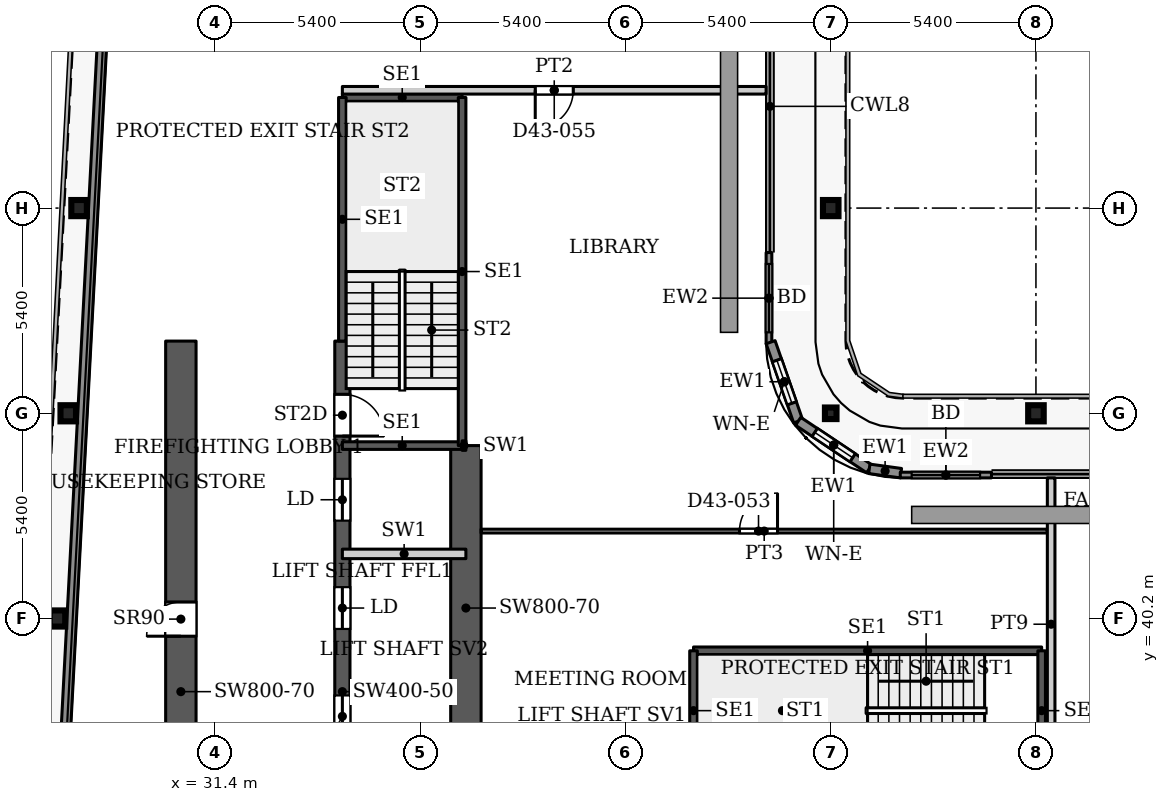
"""IFC4 building model, lengths in metres.
Left out: names, types, materials, properties, quantities, classifications, styles, units other than length and angle.
Written with IfcOpenShell. Run it as: python <this file> out.ifc"""

import sys

from ifc_helpers import new_model, si_unit, direction, frame, frame_2d, origin, origin_2d, place, context, subcontext, project, spatial, rectangle, hollow_rectangle, i_section, extrude, source, transform, mapped, element, fill, save


model = new_model("IFC4")
c1 = context("Model", 3, precision=1e-05, world=origin(), true_north=direction((0.0, 1.0)))
c2 = subcontext(c1, "Body", "Model", "MODEL_VIEW")
j1 = project(units=[si_unit("LENGTHUNIT", "METRE"), si_unit("PLANEANGLEUNIT", "RADIAN")], contexts=[c1])
p1 = place(None, origin())
s1 = spatial("IfcSite", under=j1, at=p1, CompositionType="ELEMENT")
p2 = place(p1, origin())
s2 = spatial("IfcBuilding", under=s1, at=p2, CompositionType="ELEMENT")
p3 = place(p2, frame((0.0, 0.0, 183.8)))
s3 = spatial("IfcBuildingStorey", under=s2, at=p3, CompositionType="ELEMENT", Elevation=183.8)
for number, where, z_axis, x_axis in (
    (1, (27.253, 40.2, 0.0), (0.0, 0.0, 1.0), (1.0, 0.0, 0.0)),
    (2, (27.537, 45.6, 0.0), (0.0, 0.0, 1.0), (1.0, 0.0, 0.0)),
    (3, (53.0, 45.6, 0.0), (0.0, 0.0, 1.0), (1.0, 0.0, 0.0)),
    (4, (27.822, 51.0, 0.0), (0.0, 0.0, 1.0), (1.0, 0.0, 0.0)),
    (5, (47.6, 51.0, 0.0), (0.0, 0.0, 1.0), (1.0, 0.0, 0.0)),
):
    element("IfcColumn", number, at=place(p3, frame(where, z_axis=z_axis, x_axis=x_axis)), inside=s3, PredefinedType="COLUMN", context=c2, shape_type="SweptSolid", body=[
        extrude(i_section(OverallWidth=0.409, OverallDepth=0.425, WebThickness=0.033, FlangeThickness=0.052, FilletRadius=0.013, at=origin_2d()), origin(), (0.0, 0.0, 1.0), 3.9),
    ])
p4 = place(p3, frame((47.6, 45.6, 0.0), z_axis=(0.0, 0.0, 1.0), x_axis=(1.0, 0.0, 0.0)))
e6 = element("IfcColumn", 6, at=p4, inside=s3, PredefinedType="COLUMN", context=c2, shape_type="SweptSolid", body=[
    extrude(hollow_rectangle(XDim=0.305, YDim=0.305, WallThickness=0.016, InnerFilletRadius=0.016, OuterFilletRadius=0.032, at=origin_2d()), origin(), (0.0, 0.0, 1.0), 3.9),
])
p5 = place(p3, frame((34.75, 29.05, 0.0), z_axis=(0.0, 0.0, 1.0), x_axis=(0.0, 1.0, 0.0)))
e7 = element("IfcWall", 7, at=p5, inside=s3, PredefinedType="SHEAR", context=c2, shape_type="SweptSolid", body=[
    extrude(rectangle(XDim=18.45, YDim=0.4, at=frame_2d((9.225, 0.0))), origin(), (0.0, 0.0, 1.0), 3.9),
])
p6 = place(p5, frame((8.025, 0.0, 0.0)))
e8 = element("IfcOpeningElement", 8, at=p6, cuts=e7, PredefinedType="OPENING", context=c2, shape_type="SweptSolid", body=[
    extrude(rectangle(XDim=1.1, YDim=2.2, at=frame_2d((0.55, 1.1))), frame((0.0, 0.21, 0.0), z_axis=(0.0, -1.0, 0.0), x_axis=(1.0, 0.0, 0.0)), (0.0, 0.0, 1.0), 0.42),
])
p7 = place(p5, frame((10.875, 0.0, 0.0)))
e9 = element("IfcOpeningElement", 9, at=p7, cuts=e7, PredefinedType="OPENING", context=c2, shape_type="SweptSolid", body=[
    extrude(rectangle(XDim=1.1, YDim=2.2, at=frame_2d((0.55, 1.1))), frame((0.0, 0.21, 0.0), z_axis=(0.0, -1.0, 0.0), x_axis=(1.0, 0.0, 0.0)), (0.0, 0.0, 1.0), 0.42),
])
p8 = place(p5, frame((13.725, 0.0, 0.0)))
e10 = element("IfcOpeningElement", 10, at=p8, cuts=e7, PredefinedType="OPENING", context=c2, shape_type="SweptSolid", body=[
    extrude(rectangle(XDim=1.1, YDim=2.2, at=frame_2d((0.55, 1.1))), frame((0.0, 0.21, 0.0), z_axis=(0.0, -1.0, 0.0), x_axis=(1.0, 0.0, 0.0)), (0.0, 0.0, 1.0), 0.42),
])
p9 = place(p5, frame((15.95, 0.0, 0.0)))
e11 = element("IfcOpeningElement", 11, at=p9, cuts=e7, PredefinedType="OPENING", context=c2, shape_type="SweptSolid", body=[
    extrude(rectangle(XDim=1.1, YDim=2.2, at=frame_2d((0.55, 1.1))), frame((0.0, 0.21, 0.0), z_axis=(0.0, -1.0, 0.0), x_axis=(1.0, 0.0, 0.0)), (0.0, 0.0, 1.0), 0.42),
])
p10 = place(p3, frame((38.0, 36.2, 0.0), z_axis=(0.0, 0.0, 1.0), x_axis=(0.0, 1.0, 0.0)))
e12 = element("IfcWall", 12, at=p10, inside=s3, PredefinedType="SHEAR", context=c2, shape_type="SweptSolid", body=[
    extrude(rectangle(XDim=8.55, YDim=0.8, at=frame_2d((4.275, 0.0))), origin(), (0.0, 0.0, 1.0), 3.9),
])
p11 = place(p3, frame((30.5, 29.05, 0.0), z_axis=(0.0, 0.0, 1.0), x_axis=(0.0, 1.0, 0.0)))
e13 = element("IfcWall", 13, at=p11, inside=s3, PredefinedType="SHEAR", context=c2, shape_type="SweptSolid", body=[
    extrude(rectangle(XDim=18.45, YDim=0.8, at=frame_2d((9.225, 0.0))), origin(), (0.0, 0.0, 1.0), 3.9),
])
p12 = place(p11, frame((6.21, 0.0, 0.0)))
e14 = element("IfcOpeningElement", 14, at=p12, cuts=e13, PredefinedType="OPENING", context=c2, shape_type="SweptSolid", body=[
    extrude(rectangle(XDim=0.9, YDim=2.2, at=frame_2d((0.45, 1.1))), frame((0.0, 0.41, 0.0), z_axis=(0.0, -1.0, 0.0), x_axis=(1.0, 0.0, 0.0)), (0.0, 0.0, 1.0), 0.82),
])
p13 = place(p11, frame((10.684, 0.0, 0.0)))
e15 = element("IfcOpeningElement", 15, at=p13, cuts=e13, PredefinedType="OPENING", context=c2, shape_type="SweptSolid", body=[
    extrude(rectangle(XDim=0.9, YDim=2.2, at=frame_2d((0.45, 1.1))), frame((0.0, 0.41, 0.0), z_axis=(0.0, -1.0, 0.0), x_axis=(1.0, 0.0, 0.0)), (0.0, 0.0, 1.0), 0.82),
])
p14 = place(p3, frame((27.195, 31.969, 0.0), z_axis=(0.0, 0.0, 1.0), x_axis=(0.052554995867, 0.998618031286, 0.0)))
e16 = element("IfcWall", 16, at=p14, inside=s3, PredefinedType="SOLIDWALL", context=c2, shape_type="SweptSolid", body=[
    extrude(rectangle(XDim=66.787, YDim=0.25, at=frame_2d((33.394, 0.0))), origin(), (0.0, 0.0, 1.0), 3.75),
])
p15 = place(p3, frame((45.975, 49.83, 0.0), z_axis=(0.0, 0.0, 1.0), x_axis=(0.0, -1.0, 0.0)))
e17 = element("IfcWall", 17, at=p15, inside=s3, PredefinedType="SOLIDWALL", context=c2, shape_type="SweptSolid", body=[
    extrude(rectangle(XDim=2.4, YDim=0.15, at=frame_2d((1.2, 0.0))), origin(), (0.0, 0.0, 1.0), 3.75),
])
p16 = place(p15, frame((0.3, 0.0, 0.0)))
e18 = element("IfcOpeningElement", 18, at=p16, cuts=e17, PredefinedType="OPENING", context=c2, shape_type="SweptSolid", body=[
    extrude(rectangle(XDim=1.8, YDim=2.4, at=frame_2d((0.9, 1.2))), frame((0.0, 0.085, 0.0), z_axis=(0.0, -1.0, 0.0), x_axis=(1.0, 0.0, 0.0)), (0.0, 0.0, 1.0), 0.17),
])
p17 = place(p3, frame((46.018, 47.471, 0.0), z_axis=(0.0, 0.0, 1.0), x_axis=(0.328791208903, -0.944402637093, 0.0)))
e19 = element("IfcWall", 19, at=p17, inside=s3, PredefinedType="SOLIDWALL", context=c2, shape_type="SweptSolid", body=[
    extrude(rectangle(XDim=2.205, YDim=0.25, at=frame_2d((1.102, 0.0))), origin(), (0.0, 0.0, 1.0), 3.75),
])
p18 = place(p17, frame((0.503, 0.0, 0.6)))
e20 = element("IfcOpeningElement", 20, at=p18, cuts=e19, PredefinedType="OPENING", context=c2, shape_type="SweptSolid", body=[
    extrude(rectangle(XDim=1.2, YDim=2.1, at=frame_2d((0.6, 1.05))), frame((0.0, 0.135, 0.0), z_axis=(0.0, -1.0, 0.0), x_axis=(1.0, 0.0, 0.0)), (0.0, 0.0, 1.0), 0.27),
])
p19 = place(p3, frame((46.743, 45.389, 0.0), z_axis=(0.0, 0.0, 1.0), x_axis=(0.831449265529, -0.555600682912, 0.0)))
e21 = element("IfcWall", 21, at=p19, inside=s3, PredefinedType="SOLIDWALL", context=c2, shape_type="SweptSolid", body=[
    extrude(rectangle(XDim=2.251, YDim=0.25, at=frame_2d((1.126, 0.0))), origin(), (0.0, 0.0, 1.0), 3.75),
])
p20 = place(p19, frame((0.525, 0.0, 0.6)))
e22 = element("IfcOpeningElement", 22, at=p20, cuts=e21, PredefinedType="OPENING", context=c2, shape_type="SweptSolid", body=[
    extrude(rectangle(XDim=1.2, YDim=2.1, at=frame_2d((0.6, 1.05))), frame((0.0, 0.135, 0.0), z_axis=(0.0, -1.0, 0.0), x_axis=(1.0, 0.0, 0.0)), (0.0, 0.0, 1.0), 0.27),
])
p21 = place(p3, frame((48.615, 44.138, 0.0), z_axis=(0.0, 0.0, 1.0), x_axis=(0.990741504246, -0.135761819977, 0.0)))
e23 = element("IfcWall", 23, at=p21, inside=s3, PredefinedType="SOLIDWALL", context=c2, shape_type="SweptSolid", body=[
    extrude(rectangle(XDim=0.84, YDim=0.25, at=frame_2d((0.42, 0.0))), origin(), (0.0, 0.0, 1.0), 3.75),
])
p22 = place(p3, frame((49.43, 43.975, 0.0), z_axis=(0.0, 0.0, 1.0), x_axis=(1.0, 0.0, 0.0)))
e24 = element("IfcWall", 24, at=p22, inside=s3, PredefinedType="SOLIDWALL", context=c2, shape_type="SweptSolid", body=[
    extrude(rectangle(XDim=2.4, YDim=0.15, at=frame_2d((1.2, 0.0))), origin(), (0.0, 0.0, 1.0), 3.75),
])
p23 = place(p22, frame((0.3, 0.0, 0.0)))
e25 = element("IfcOpeningElement", 25, at=p23, cuts=e24, PredefinedType="OPENING", context=c2, shape_type="SweptSolid", body=[
    extrude(rectangle(XDim=1.8, YDim=2.4, at=frame_2d((0.9, 1.2))), frame((0.0, 0.085, 0.0), z_axis=(0.0, -1.0, 0.0), x_axis=(1.0, 0.0, 0.0)), (0.0, 0.0, 1.0), 0.17),
])
p24 = place(p3, frame((43.99, 39.35, 0.0), z_axis=(0.0, 0.0, 1.0), x_axis=(1.0, 0.0, 0.0)))
e26 = element("IfcWall", 26, at=p24, inside=s3, PredefinedType="SHEAR", context=c2, shape_type="SweptSolid", body=[
    extrude(rectangle(XDim=9.16, YDim=0.2, at=frame_2d((4.58, 0.0))), origin(), (0.0, 0.0, 1.0), 3.9),
])
for number, where, z_axis, x_axis in (
    (27, (43.99, 36.2, 0.0), (0.0, 0.0, 1.0), (0.0, 1.0, 0.0)),
    (28, (53.15, 36.2, 0.0), (0.0, 0.0, 1.0), (0.0, 1.0, 0.0)),
):
    element("IfcWall", number, at=place(p3, frame(where, z_axis=z_axis, x_axis=x_axis)), inside=s3, PredefinedType="SHEAR", context=c2, shape_type="SweptSolid", body=[
        extrude(rectangle(XDim=3.15, YDim=0.2, at=frame_2d((1.575, 0.0))), origin(), (0.0, 0.0, 1.0), 3.9),
    ])
for number, where, z_axis, x_axis in (
    (29, (34.75, 44.75, 0.0), (0.0, 0.0, 1.0), (1.0, 0.0, 0.0)),
    (30, (34.75, 53.91, 0.0), (0.0, 0.0, 1.0), (1.0, 0.0, 0.0)),
):
    element("IfcWall", number, at=place(p3, frame(where, z_axis=z_axis, x_axis=x_axis)), inside=s3, PredefinedType="SHEAR", context=c2, shape_type="SweptSolid", body=[
        extrude(rectangle(XDim=3.15, YDim=0.2, at=frame_2d((1.575, 0.0))), origin(), (0.0, 0.0, 1.0), 3.9),
    ])
p25 = place(p3, frame((34.75, 47.5, 0.0), z_axis=(0.0, 0.0, 1.0), x_axis=(0.0, 1.0, 0.0)))
e31 = element("IfcWall", 31, at=p25, inside=s3, PredefinedType="SHEAR", context=c2, shape_type="SweptSolid", body=[
    extrude(rectangle(XDim=6.41, YDim=0.2, at=frame_2d((3.205, 0.0))), origin(), (0.0, 0.0, 1.0), 3.9),
])
p26 = place(p3, frame((37.9, 44.75, 0.0), z_axis=(0.0, 0.0, 1.0), x_axis=(0.0, 1.0, 0.0)))
e32 = element("IfcWall", 32, at=p26, inside=s3, PredefinedType="SHEAR", context=c2, shape_type="SweptSolid", body=[
    extrude(rectangle(XDim=9.16, YDim=0.2, at=frame_2d((4.58, 0.0))), origin(), (0.0, 0.0, 1.0), 3.9),
])
p27 = place(p3, frame((34.75, 41.9, 0.0), z_axis=(0.0, 0.0, 1.0), x_axis=(1.0, 0.0, 0.0)))
e33 = element("IfcWall", 33, at=p27, inside=s3, PredefinedType="PARTITIONING", context=c2, shape_type="SweptSolid", body=[
    extrude(rectangle(XDim=3.25, YDim=0.25, at=frame_2d((1.625, 0.0))), origin(), (0.0, 0.0, 1.0), 3.9),
])
p28 = place(p3, frame((37.9, 44.75, 0.0), z_axis=(0.0, 0.0, 1.0), x_axis=(1.0, 0.0, 0.0)))
e34 = element("IfcWall", 34, at=p28, inside=s3, PredefinedType="PARTITIONING", context=c2, shape_type="SweptSolid", body=[
    extrude(rectangle(XDim=0.1, YDim=0.25, at=frame_2d((0.05, 0.0))), origin(), (0.0, 0.0, 1.0), 3.9),
])
p29 = place(p3, frame((34.75, 54.1, 0.0), z_axis=(0.0, 0.0, 1.0), x_axis=(1.0, 0.0, 0.0)))
e35 = element("IfcWall", 35, at=p29, inside=s3, PredefinedType="PARTITIONING", context=c2, shape_type="SweptSolid", body=[
    extrude(rectangle(XDim=11.15, YDim=0.2, at=frame_2d((5.575, 0.0))), origin(), (0.0, 0.0, 1.0), 3.6),
])
p30 = place(p29, frame((5.075, 0.0, 0.0)))
e36 = element("IfcOpeningElement", 36, at=p30, cuts=e35, PredefinedType="OPENING", context=c2, shape_type="SweptSolid", body=[
    extrude(rectangle(XDim=1.0, YDim=2.1, at=frame_2d((0.5, 1.05))), frame((0.0, 0.11, 0.0), z_axis=(0.0, -1.0, 0.0), x_axis=(1.0, 0.0, 0.0)), (0.0, 0.0, 1.0), 0.22),
])
p31 = place(p3, frame((38.399, 42.5, 0.0), z_axis=(0.0, 0.0, 1.0), x_axis=(1.0, 0.0, 0.0)))
e37 = element("IfcWall", 37, at=p31, inside=s3, PredefinedType="PARTITIONING", context=c2, shape_type="SweptSolid", body=[
    extrude(rectangle(XDim=14.901, YDim=0.1, at=frame_2d((7.451, 0.0))), origin(), (0.0, 0.0, 1.0), 3.6),
])
p32 = place(p31, frame((6.801, 0.0, 0.0)))
e38 = element("IfcOpeningElement", 38, at=p32, cuts=e37, PredefinedType="OPENING", context=c2, shape_type="SweptSolid", body=[
    extrude(rectangle(XDim=1.0, YDim=2.1, at=frame_2d((0.5, 1.05))), frame((0.0, 0.06, 0.0), z_axis=(0.0, -1.0, 0.0), x_axis=(1.0, 0.0, 0.0)), (0.0, 0.0, 1.0), 0.12),
])
p33 = place(p3, frame((53.4, 36.199, 0.0), z_axis=(0.0, 0.0, 1.0), x_axis=(0.0, 1.0, 0.0)))
e39 = element("IfcWall", 39, at=p33, inside=s3, PredefinedType="PARTITIONING", context=c2, shape_type="SweptSolid", body=[
    extrude(rectangle(XDim=7.701, YDim=0.2, at=frame_2d((3.851, 0.0))), origin(), (0.0, 0.0, 1.0), 3.6),
])
m1 = source(origin(), c2, "Body", "SweptSolid", [
    extrude(rectangle(XDim=1.8, YDim=2.4, at=frame_2d((0.9, 1.2))), frame((0.0, 0.025, 0.0), z_axis=(0.0, -1.0, 0.0), x_axis=(1.0, 0.0, 0.0)), (0.0, 0.0, 1.0), 0.05),
])
p34 = place(p16, origin())
e40 = element("IfcDoor", 40, at=p34, inside=s3, OperationType="SLIDING_TO_LEFT", PredefinedType="DOOR", context=c2, shape_type="MappedRepresentation", body=[
    mapped(m1, transform((0.0, 0.0, 0.0), x_axis=(1.0, 0.0, 0.0), y_axis=(0.0, 1.0, 0.0), z_axis=(0.0, 0.0, 1.0), scale=1.0)),
])
fill(e18, e40)
m2 = source(origin(), c2, "Body", "SweptSolid", [
    extrude(rectangle(XDim=1.2, YDim=2.1, at=frame_2d((0.6, 1.05))), frame((0.0, 0.03, 0.0), z_axis=(0.0, -1.0, 0.0), x_axis=(1.0, 0.0, 0.0)), (0.0, 0.0, 1.0), 0.06),
])
p35 = place(p18, origin())
e41 = element("IfcWindow", 41, at=p35, inside=s3, PartitioningType="SINGLE_PANEL", PredefinedType="WINDOW", context=c2, shape_type="MappedRepresentation", body=[
    mapped(m2, transform((0.0, 0.0, 0.0), x_axis=(1.0, 0.0, 0.0), y_axis=(0.0, 1.0, 0.0), z_axis=(0.0, 0.0, 1.0), scale=1.0)),
])
fill(e20, e41)
p36 = place(p20, origin())
e42 = element("IfcWindow", 42, at=p36, inside=s3, PartitioningType="SINGLE_PANEL", PredefinedType="WINDOW", context=c2, shape_type="MappedRepresentation", body=[
    mapped(m2, transform((0.0, 0.0, 0.0), x_axis=(1.0, 0.0, 0.0), y_axis=(0.0, 1.0, 0.0), z_axis=(0.0, 0.0, 1.0), scale=1.0)),
])
fill(e22, e42)
p37 = place(p23, origin())
e43 = element("IfcDoor", 43, at=p37, inside=s3, OperationType="SLIDING_TO_LEFT", PredefinedType="DOOR", context=c2, shape_type="MappedRepresentation", body=[
    mapped(m1, transform((0.0, 0.0, 0.0), x_axis=(1.0, 0.0, 0.0), y_axis=(0.0, 1.0, 0.0), z_axis=(0.0, 0.0, 1.0), scale=1.0)),
])
fill(e25, e43)
m3 = source(origin(), c2, "Body", "SweptSolid", [
    extrude(rectangle(XDim=1.1, YDim=2.2, at=frame_2d((0.55, 1.1))), frame((0.0, 0.025, 0.0), z_axis=(0.0, -1.0, 0.0), x_axis=(1.0, 0.0, 0.0)), (0.0, 0.0, 1.0), 0.05),
])
p38 = place(p6, origin())
e44 = element("IfcDoor", 44, at=p38, inside=s3, OperationType="SLIDING_TO_LEFT", PredefinedType="DOOR", context=c2, shape_type="MappedRepresentation", body=[
    mapped(m3, transform((0.0, 0.0, 0.0), x_axis=(1.0, 0.0, 0.0), y_axis=(0.0, 1.0, 0.0), z_axis=(0.0, 0.0, 1.0), scale=1.0)),
])
fill(e8, e44)
p39 = place(p7, origin())
e45 = element("IfcDoor", 45, at=p39, inside=s3, OperationType="SLIDING_TO_LEFT", PredefinedType="DOOR", context=c2, shape_type="MappedRepresentation", body=[
    mapped(m3, transform((0.0, 0.0, 0.0), x_axis=(1.0, 0.0, 0.0), y_axis=(0.0, 1.0, 0.0), z_axis=(0.0, 0.0, 1.0), scale=1.0)),
])
fill(e9, e45)
p40 = place(p8, origin())
e46 = element("IfcDoor", 46, at=p40, inside=s3, OperationType="SLIDING_TO_LEFT", PredefinedType="DOOR", context=c2, shape_type="MappedRepresentation", body=[
    mapped(m3, transform((0.0, 0.0, 0.0), x_axis=(1.0, 0.0, 0.0), y_axis=(0.0, 1.0, 0.0), z_axis=(0.0, 0.0, 1.0), scale=1.0)),
])
fill(e10, e46)
m4 = source(origin(), c2, "Body", "SweptSolid", [
    extrude(rectangle(XDim=0.9, YDim=2.2, at=frame_2d((0.45, 1.1))), frame((0.0, 0.025, 0.0), z_axis=(0.0, -1.0, 0.0), x_axis=(1.0, 0.0, 0.0)), (0.0, 0.0, 1.0), 0.05),
])
p41 = place(p13, origin())
e47 = element("IfcDoor", 47, at=p41, inside=s3, OperationType="SINGLE_SWING_LEFT", PredefinedType="DOOR", context=c2, shape_type="MappedRepresentation", body=[
    mapped(m4, transform((0.0, 0.0, 0.0), x_axis=(1.0, 0.0, 0.0), y_axis=(0.0, 1.0, 0.0), z_axis=(0.0, 0.0, 1.0), scale=1.0)),
])
fill(e15, e47)
m5 = source(origin(), c2, "Body", "SweptSolid", [
    extrude(rectangle(XDim=1.1, YDim=2.2, at=frame_2d((0.55, 1.1))), frame((0.0, 0.025, 0.0), z_axis=(0.0, -1.0, 0.0), x_axis=(1.0, 0.0, 0.0)), (0.0, 0.0, 1.0), 0.05),
])
p42 = place(p9, origin())
e48 = element("IfcDoor", 48, at=p42, inside=s3, OperationType="SINGLE_SWING_RIGHT", PredefinedType="DOOR", context=c2, shape_type="MappedRepresentation", body=[
    mapped(m5, transform((0.0, 0.0, 0.0), x_axis=(1.0, 0.0, 0.0), y_axis=(0.0, 1.0, 0.0), z_axis=(0.0, 0.0, 1.0), scale=1.0)),
])
fill(e11, e48)
m6 = source(origin(), c2, "Body", "SweptSolid", [
    extrude(rectangle(XDim=1.0, YDim=2.1, at=frame_2d((0.5, 1.05))), frame((0.0, 0.025, 0.0), z_axis=(0.0, -1.0, 0.0), x_axis=(1.0, 0.0, 0.0)), (0.0, 0.0, 1.0), 0.05),
])
p43 = place(p32, origin())
e49 = element("IfcDoor", 49, at=p43, inside=s3, OperationType="SINGLE_SWING_LEFT", PredefinedType="DOOR", context=c2, shape_type="MappedRepresentation", body=[
    mapped(m6, transform((0.0, 0.0, 0.0), x_axis=(1.0, 0.0, 0.0), y_axis=(0.0, 1.0, 0.0), z_axis=(0.0, 0.0, 1.0), scale=1.0)),
])
fill(e38, e49)
m7 = source(origin(), c2, "Body", "SweptSolid", [
    extrude(rectangle(XDim=1.0, YDim=2.1, at=frame_2d((0.5, 1.05))), frame((0.0, 0.025, 0.0), z_axis=(0.0, -1.0, 0.0), x_axis=(1.0, 0.0, 0.0)), (0.0, 0.0, 1.0), 0.05),
])
p44 = place(p30, origin())
e50 = element("IfcDoor", 50, at=p44, inside=s3, OperationType="SINGLE_SWING_RIGHT", PredefinedType="DOOR", context=c2, shape_type="MappedRepresentation", body=[
    mapped(m7, transform((0.0, 0.0, 0.0), x_axis=(1.0, 0.0, 0.0), y_axis=(0.0, 1.0, 0.0), z_axis=(0.0, 0.0, 1.0), scale=1.0)),
])
fill(e36, e50)
save(model, sys.argv[1])
